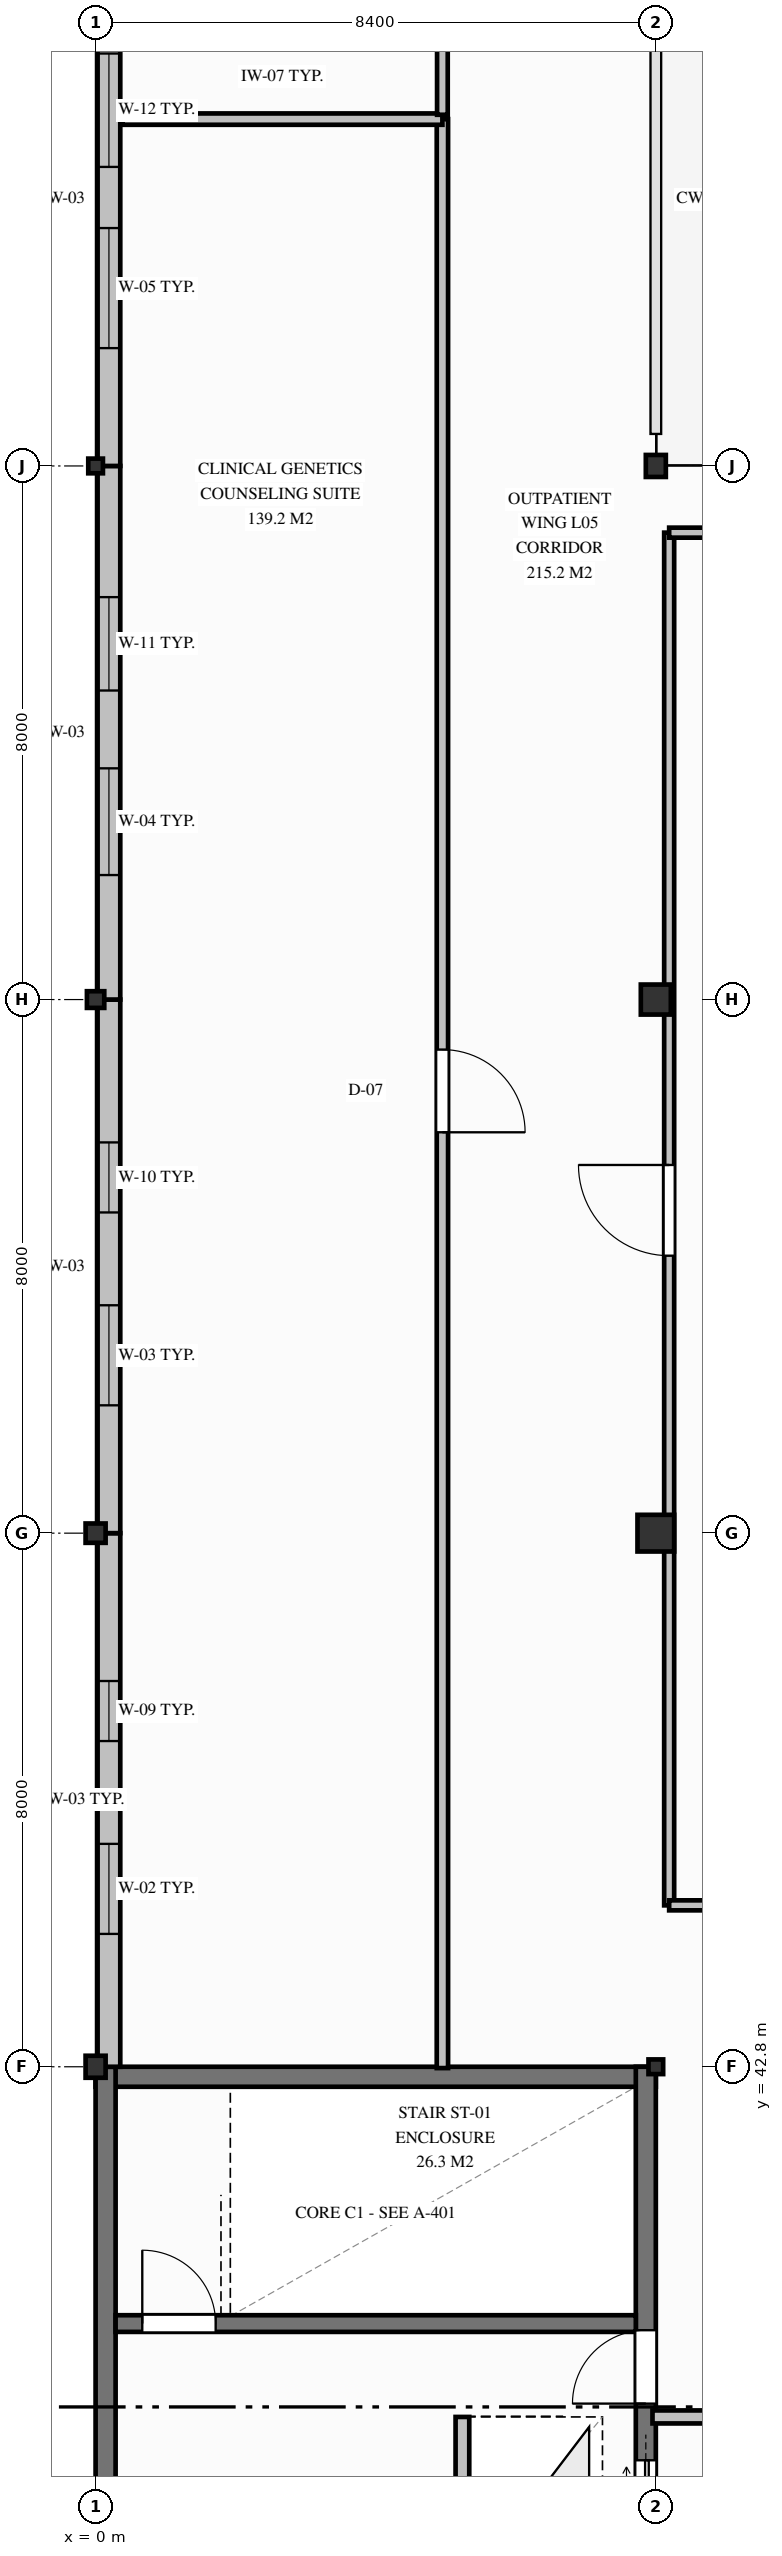
"""IFC4 building model, lengths in metres.
Left out: names, types, materials, properties, quantities, classifications, styles, units other than length and angle.
Written with IfcOpenShell. Run it as: python <this file> out.ifc"""

import sys

from ifc_helpers import new_model, si_unit, direction, frame, frame_2d, origin, origin_2d, place, context, subcontext, project, spatial, rectangle, hollow_rectangle, i_section, extrude, element, fill, save


model = new_model("IFC4")
c1 = context("Model", 3, precision=1e-05, world=origin(), true_north=direction((0.0, 1.0)))
c2 = subcontext(c1, "Body", "Model", "MODEL_VIEW")
j1 = project(units=[si_unit("LENGTHUNIT", "METRE"), si_unit("PLANEANGLEUNIT", "RADIAN")], contexts=[c1])
p1 = place(None, origin())
s1 = spatial("IfcSite", under=j1, at=p1, CompositionType="ELEMENT")
p2 = place(p1, origin())
s2 = spatial("IfcBuilding", under=s1, at=p2, CompositionType="ELEMENT")
p3 = place(p2, frame((0.0, 0.0, 21.3)))
s3 = spatial("IfcBuildingStorey", under=s2, at=p3, CompositionType="ELEMENT", Elevation=21.3)
p4 = place(p3, frame((0.0, 42.65, 0.0), z_axis=(0.0, 0.0, 1.0), x_axis=(1.0, 0.0, 0.0)))
e1 = element("IfcWall", 1, at=p4, inside=s3, PredefinedType="SHEAR", context=c2, shape_type="SweptSolid", body=[
    extrude(rectangle(XDim=8.4, YDim=0.3, at=frame_2d((4.2, 0.0))), origin(), (0.0, 0.0, 1.0), 5.15),
])
p5 = place(p3, frame((0.15, 34.8, 0.0), z_axis=(0.0, 0.0, 1.0), x_axis=(0.0, 1.0, 0.0)))
e2 = element("IfcWall", 2, at=p5, inside=s3, PredefinedType="SHEAR", context=c2, shape_type="SweptSolid", body=[
    extrude(rectangle(XDim=8.0, YDim=0.3, at=frame_2d((4.0, 0.0))), origin(), (0.0, 0.0, 1.0), 5.15),
])
p6 = place(p3, frame((8.25, 34.8, 0.0), z_axis=(0.0, 0.0, 1.0), x_axis=(0.0, 1.0, 0.0)))
e3 = element("IfcWall", 3, at=p6, inside=s3, PredefinedType="SHEAR", context=c2, shape_type="SweptSolid", body=[
    extrude(rectangle(XDim=8.0, YDim=0.3, at=frame_2d((4.0, 0.0))), origin(), (0.0, 0.0, 1.0), 5.15),
])
p7 = place(p6, frame((2.95, 0.0, 0.0)))
e4 = element("IfcOpeningElement", 4, at=p7, cuts=e3, PredefinedType="OPENING", context=c2, shape_type="SweptSolid", body=[
    extrude(rectangle(XDim=1.1, YDim=2.15, at=frame_2d((0.55, 1.075))), frame((0.0, 0.16, 0.0), z_axis=(0.0, -1.0, 0.0), x_axis=(1.0, 0.0, 0.0)), (0.0, 0.0, 1.0), 0.32),
])
p8 = place(p6, frame((1.0, 0.0, 0.0)))
e5 = element("IfcOpeningElement", 5, at=p8, cuts=e3, PredefinedType="OPENING", context=c2, shape_type="SweptSolid", body=[
    extrude(rectangle(XDim=1.1, YDim=2.1, at=frame_2d((0.55, 1.05))), frame((0.0, 0.16, 0.0), z_axis=(0.0, -1.0, 0.0), x_axis=(1.0, 0.0, 0.0)), (0.0, 0.0, 1.0), 0.32),
])
p9 = place(p3, frame((0.3, 38.95, 0.0), z_axis=(0.0, 0.0, 1.0), x_axis=(1.0, 0.0, 0.0)))
e6 = element("IfcWall", 6, at=p9, inside=s3, PredefinedType="SHEAR", context=c2, shape_type="SweptSolid", body=[
    extrude(rectangle(XDim=7.8, YDim=0.25, at=frame_2d((3.9, 0.0))), origin(), (0.0, 0.0, 1.0), 5.15),
])
p10 = place(p9, frame((0.4, 0.0, 0.0)))
e7 = element("IfcOpeningElement", 7, at=p10, cuts=e6, PredefinedType="OPENING", context=c2, shape_type="SweptSolid", body=[
    extrude(rectangle(XDim=1.1, YDim=2.15, at=frame_2d((0.55, 1.075))), frame((0.0, 0.135, 0.0), z_axis=(0.0, -1.0, 0.0), x_axis=(1.0, 0.0, 0.0)), (0.0, 0.0, 1.0), 0.27),
])
p11 = place(p3, frame((0.0, 42.8, 0.0), z_axis=(0.0, 0.0, 1.0), x_axis=(1.0, 0.0, 0.0)))
e8 = element("IfcColumn", 8, at=p11, inside=s3, PredefinedType="COLUMN", context=c2, shape_type="SweptSolid", body=[
    extrude(i_section(OverallWidth=0.3, OverallDepth=0.33, WebThickness=0.01, FlangeThickness=0.017, FilletRadius=0.027, at=origin_2d()), origin(), (0.0, 0.0, 1.0), 4.05),
])
p12 = place(p3, frame((0.0, 50.8, 0.0), z_axis=(0.0, 0.0, 1.0), x_axis=(1.0, 0.0, 0.0)))
e9 = element("IfcColumn", 9, at=p12, inside=s3, PredefinedType="COLUMN", context=c2, shape_type="SweptSolid", body=[
    extrude(i_section(OverallWidth=0.3, OverallDepth=0.29, WebThickness=0.009, FlangeThickness=0.014, FilletRadius=0.027, at=origin_2d()), origin(), (0.0, 0.0, 1.0), 4.05),
])
p13 = place(p3, frame((0.0, 58.8, 0.0), z_axis=(0.0, 0.0, 1.0), x_axis=(1.0, 0.0, 0.0)))
e10 = element("IfcColumn", 10, at=p13, inside=s3, PredefinedType="COLUMN", context=c2, shape_type="SweptSolid", body=[
    extrude(i_section(OverallWidth=0.26, OverallDepth=0.25, WebThickness=0.008, FlangeThickness=0.012, FilletRadius=0.024, at=origin_2d()), origin(), (0.0, 0.0, 1.0), 4.05),
])
for number, where, z_axis, x_axis in (
    (11, (0.0, 66.8, 0.0), (0.0, 0.0, 1.0), (1.0, 0.0, 0.0)),
    (12, (8.4, 42.8, 0.0), (0.0, 0.0, 1.0), (1.0, 0.0, 0.0)),
):
    element("IfcColumn", number, at=place(p3, frame(where, z_axis=z_axis, x_axis=x_axis)), inside=s3, PredefinedType="COLUMN", context=c2, shape_type="SweptSolid", body=[
        extrude(hollow_rectangle(XDim=0.22, YDim=0.22, WallThickness=0.012, InnerFilletRadius=0.019, OuterFilletRadius=0.031, at=origin_2d()), origin(), (0.0, 0.0, 1.0), 4.05),
    ])
p14 = place(p3, frame((8.4, 50.8, 0.0), z_axis=(0.0, 0.0, 1.0), x_axis=(1.0, 0.0, 0.0)))
e13 = element("IfcColumn", 13, at=p14, inside=s3, PredefinedType="COLUMN", context=c2, shape_type="SweptSolid", body=[
    extrude(rectangle(XDim=0.55, YDim=0.55, at=origin_2d()), origin(), (0.0, 0.0, 1.0), 4.05),
])
p15 = place(p3, frame((8.4, 58.8, 0.0), z_axis=(0.0, 0.0, 1.0), x_axis=(1.0, 0.0, 0.0)))
e14 = element("IfcColumn", 14, at=p15, inside=s3, PredefinedType="COLUMN", context=c2, shape_type="SweptSolid", body=[
    extrude(rectangle(XDim=0.45, YDim=0.45, at=origin_2d()), origin(), (0.0, 0.0, 1.0), 4.05),
])
p16 = place(p3, frame((8.4, 66.8, 0.0), z_axis=(0.0, 0.0, 1.0), x_axis=(1.0, 0.0, 0.0)))
e15 = element("IfcColumn", 15, at=p16, inside=s3, PredefinedType="COLUMN", context=c2, shape_type="SweptSolid", body=[
    extrude(i_section(OverallWidth=0.3, OverallDepth=0.33, WebThickness=0.01, FlangeThickness=0.017, FilletRadius=0.027, at=origin_2d()), origin(), (0.0, 0.0, 1.0), 4.05),
])
p17 = place(p3, frame((0.2, 42.8, 0.0), z_axis=(0.0, 0.0, 1.0), x_axis=(0.0, 1.0, 0.0)))
e16 = element("IfcWall", 16, at=p17, inside=s3, PredefinedType="SOLIDWALL", context=c2, shape_type="SweptSolid", body=[
    extrude(rectangle(XDim=8.0, YDim=0.34, at=frame_2d((4.0, 0.0))), origin(), (0.0, 0.0, 1.0), 3.378),
])
p18 = place(p17, frame((1.992, 0.0, 0.85)))
e17 = element("IfcOpeningElement", 17, at=p18, cuts=e16, PredefinedType="OPENING", context=c2, shape_type="SweptSolid", body=[
    extrude(rectangle(XDim=1.35, YDim=1.8, at=frame_2d((0.675, 0.9))), frame((0.0, 0.18, 0.0), z_axis=(0.0, -1.0, 0.0), x_axis=(1.0, 0.0, 0.0)), (0.0, 0.0, 1.0), 0.36),
])
p19 = place(p17, frame((4.883, 0.0, 0.85)))
e18 = element("IfcOpeningElement", 18, at=p19, cuts=e16, PredefinedType="OPENING", context=c2, shape_type="SweptSolid", body=[
    extrude(rectangle(XDim=0.9, YDim=1.8, at=frame_2d((0.45, 0.9))), frame((0.0, 0.18, 0.0), z_axis=(0.0, -1.0, 0.0), x_axis=(1.0, 0.0, 0.0)), (0.0, 0.0, 1.0), 0.36),
])
p20 = place(p3, frame((0.2, 50.8, 0.0), z_axis=(0.0, 0.0, 1.0), x_axis=(0.0, 1.0, 0.0)))
e19 = element("IfcWall", 19, at=p20, inside=s3, PredefinedType="SOLIDWALL", context=c2, shape_type="SweptSolid", body=[
    extrude(rectangle(XDim=8.0, YDim=0.34, at=frame_2d((4.0, 0.0))), origin(), (0.0, 0.0, 1.0), 3.388),
])
p21 = place(p20, frame((1.917, 0.0, 0.85)))
e20 = element("IfcOpeningElement", 20, at=p21, cuts=e19, PredefinedType="OPENING", context=c2, shape_type="SweptSolid", body=[
    extrude(rectangle(XDim=1.5, YDim=1.85, at=frame_2d((0.75, 0.925))), frame((0.0, 0.18, 0.0), z_axis=(0.0, -1.0, 0.0), x_axis=(1.0, 0.0, 0.0)), (0.0, 0.0, 1.0), 0.36),
])
p22 = place(p20, frame((4.808, 0.0, 0.85)))
e21 = element("IfcOpeningElement", 21, at=p22, cuts=e19, PredefinedType="OPENING", context=c2, shape_type="SweptSolid", body=[
    extrude(rectangle(XDim=1.05, YDim=1.75, at=frame_2d((0.525, 0.875))), frame((0.0, 0.18, 0.0), z_axis=(0.0, -1.0, 0.0), x_axis=(1.0, 0.0, 0.0)), (0.0, 0.0, 1.0), 0.36),
])
p23 = place(p3, frame((0.2, 58.8, 0.0), z_axis=(0.0, 0.0, 1.0), x_axis=(0.0, 1.0, 0.0)))
e22 = element("IfcWall", 22, at=p23, inside=s3, PredefinedType="SOLIDWALL", context=c2, shape_type="SweptSolid", body=[
    extrude(rectangle(XDim=8.0, YDim=0.34, at=frame_2d((4.0, 0.0))), origin(), (0.0, 0.0, 1.0), 3.508),
])
p24 = place(p23, frame((1.867, 0.0, 0.85)))
e23 = element("IfcOpeningElement", 23, at=p24, cuts=e22, PredefinedType="OPENING", context=c2, shape_type="SweptSolid", body=[
    extrude(rectangle(XDim=1.6, YDim=1.9, at=frame_2d((0.8, 0.95))), frame((0.0, 0.18, 0.0), z_axis=(0.0, -1.0, 0.0), x_axis=(1.0, 0.0, 0.0)), (0.0, 0.0, 1.0), 0.36),
])
p25 = place(p23, frame((4.633, 0.0, 0.85)))
e24 = element("IfcOpeningElement", 24, at=p25, cuts=e22, PredefinedType="OPENING", context=c2, shape_type="SweptSolid", body=[
    extrude(rectangle(XDim=1.4, YDim=1.65, at=frame_2d((0.7, 0.825))), frame((0.0, 0.18, 0.0), z_axis=(0.0, -1.0, 0.0), x_axis=(1.0, 0.0, 0.0)), (0.0, 0.0, 1.0), 0.36),
])
p26 = place(p3, frame((0.2, 66.8, 0.0), z_axis=(0.0, 0.0, 1.0), x_axis=(0.0, 1.0, 0.0)))
e25 = element("IfcWall", 25, at=p26, inside=s3, PredefinedType="SOLIDWALL", context=c2, shape_type="SweptSolid", body=[
    extrude(rectangle(XDim=8.0, YDim=0.34, at=frame_2d((4.0, 0.0))), origin(), (0.0, 0.0, 1.0), 3.328),
])
p27 = place(p26, frame((1.767, 0.0, 0.85)))
e26 = element("IfcOpeningElement", 26, at=p27, cuts=e25, PredefinedType="OPENING", context=c2, shape_type="SweptSolid", body=[
    extrude(rectangle(XDim=1.8, YDim=1.95, at=frame_2d((0.9, 0.975))), frame((0.0, 0.18, 0.0), z_axis=(0.0, -1.0, 0.0), x_axis=(1.0, 0.0, 0.0)), (0.0, 0.0, 1.0), 0.36),
])
p28 = place(p26, frame((4.483, 0.0, 0.85)))
e27 = element("IfcOpeningElement", 27, at=p28, cuts=e25, PredefinedType="OPENING", context=c2, shape_type="SweptSolid", body=[
    extrude(rectangle(XDim=1.7, YDim=1.75, at=frame_2d((0.85, 0.875))), frame((0.0, 0.18, 0.0), z_axis=(0.0, -1.0, 0.0), x_axis=(1.0, 0.0, 0.0)), (0.0, 0.0, 1.0), 0.36),
])
p29 = place(p3, frame((5.5, 35.15, 0.0), z_axis=(0.0, 0.0, 1.0), x_axis=(0.0, 1.0, 0.0)))
e28 = element("IfcWall", 28, at=p29, inside=s3, PredefinedType="PARTITIONING", context=c2, shape_type="SweptSolid", body=[
    extrude(rectangle(XDim=2.4, YDim=0.205, at=frame_2d((1.2, 0.0))), origin(), (0.0, 0.0, 1.0), 3.78),
])
p30 = place(p3, frame((8.35, 37.55, 0.0), z_axis=(0.0, 0.0, 1.0), x_axis=(1.0, 0.0, 0.0)))
e29 = element("IfcWall", 29, at=p30, inside=s3, PredefinedType="PARTITIONING", context=c2, shape_type="SweptSolid", body=[
    extrude(rectangle(XDim=3.1, YDim=0.195, at=frame_2d((1.55, 0.0))), origin(), (0.0, 0.0, 1.0), 3.178),
])
p31 = place(p30, frame((0.95, 0.0, 0.0)))
e30 = element("IfcOpeningElement", 30, at=p31, cuts=e29, PredefinedType="OPENING", context=c2, shape_type="SweptSolid", body=[
    extrude(rectangle(XDim=1.2, YDim=2.15, at=frame_2d((0.6, 1.075))), frame((0.0, 0.107, 0.0), z_axis=(0.0, -1.0, 0.0), x_axis=(1.0, 0.0, 0.0)), (0.0, 0.0, 1.0), 0.215),
])
p32 = place(p3, frame((5.2, 72.0, 0.0), z_axis=(0.0, 0.0, 1.0), x_axis=(0.0, -1.0, 0.0)))
e31 = element("IfcWall", 31, at=p32, inside=s3, PredefinedType="PARTITIONING", context=c2, shape_type="SweptSolid", body=[
    extrude(rectangle(XDim=29.22, YDim=0.17, at=frame_2d((14.61, 0.0))), origin(), (0.0, 0.0, 1.0), 3.378),
])
p33 = place(p32, frame((13.95, 0.0, 0.0)))
e32 = element("IfcOpeningElement", 32, at=p33, cuts=e31, PredefinedType="OPENING", context=c2, shape_type="SweptSolid", body=[
    extrude(rectangle(XDim=1.24, YDim=2.2, at=frame_2d((0.62, 1.1))), frame((0.0, 0.095, 0.0), z_axis=(0.0, -1.0, 0.0), x_axis=(1.0, 0.0, 0.0)), (0.0, 0.0, 1.0), 0.19),
])
p34 = place(p3, frame((0.4, 72.0, 0.0), z_axis=(0.0, 0.0, 1.0), x_axis=(1.0, 0.0, 0.0)))
e33 = element("IfcWall", 33, at=p34, inside=s3, PredefinedType="PARTITIONING", context=c2, shape_type="SweptSolid", body=[
    extrude(rectangle(XDim=4.8, YDim=0.17, at=frame_2d((2.4, 0.0))), origin(), (0.0, 0.0, 1.0), 3.78),
])
p35 = place(p3, frame((5.2, 94.4, 0.0), z_axis=(0.0, 0.0, 1.0), x_axis=(0.0, -1.0, 0.0)))
e34 = element("IfcWall", 34, at=p35, inside=s3, PredefinedType="PARTITIONING", context=c2, shape_type="SweptSolid", body=[
    extrude(rectangle(XDim=22.335, YDim=0.16, at=frame_2d((11.167, 0.0))), origin(), (0.0, 0.0, 1.0), 3.328),
])
p36 = place(p35, frame((10.45, 0.0, 0.0)))
e35 = element("IfcOpeningElement", 35, at=p36, cuts=e34, PredefinedType="OPENING", context=c2, shape_type="SweptSolid", body=[
    extrude(rectangle(XDim=1.28, YDim=2.22, at=frame_2d((0.64, 1.11))), frame((0.0, 0.09, 0.0), z_axis=(0.0, -1.0, 0.0), x_axis=(1.0, 0.0, 0.0)), (0.0, 0.0, 1.0), 0.18),
])
p37 = place(p3, frame((8.6, 45.22, 0.0), z_axis=(0.0, 0.0, 1.0), x_axis=(0.0, 1.0, 0.0)))
e36 = element("IfcWall", 36, at=p37, inside=s3, PredefinedType="PARTITIONING", context=c2, shape_type="SweptSolid", body=[
    extrude(rectangle(XDim=20.58, YDim=0.15, at=frame_2d((10.29, 0.0))), origin(), (0.0, 0.0, 1.0), 3.328),
])
p38 = place(p37, frame((9.74, 0.0, 0.0)))
e37 = element("IfcOpeningElement", 37, at=p38, cuts=e36, PredefinedType="OPENING", context=c2, shape_type="SweptSolid", body=[
    extrude(rectangle(XDim=1.36, YDim=2.2, at=frame_2d((0.68, 1.1))), frame((0.0, 0.085, 0.0), z_axis=(0.0, -1.0, 0.0), x_axis=(1.0, 0.0, 0.0)), (0.0, 0.0, 1.0), 0.17),
])
p39 = place(p3, frame((12.22, 45.22, 0.0), z_axis=(0.0, 0.0, 1.0), x_axis=(-1.0, 0.0, 0.0)))
e38 = element("IfcWall", 38, at=p39, inside=s3, PredefinedType="PARTITIONING", context=c2, shape_type="SweptSolid", body=[
    extrude(rectangle(XDim=3.62, YDim=0.15, at=frame_2d((1.81, 0.0))), origin(), (0.0, 0.0, 1.0), 3.328),
])
p40 = place(p3, frame((8.6, 65.8, 0.0), z_axis=(0.0, 0.0, 1.0), x_axis=(1.0, 0.0, 0.0)))
e39 = element("IfcWall", 39, at=p40, inside=s3, PredefinedType="PARTITIONING", context=c2, shape_type="SweptSolid", body=[
    extrude(rectangle(XDim=7.4, YDim=0.15, at=frame_2d((3.7, 0.0))), origin(), (0.0, 0.0, 1.0), 3.438),
])
p41 = place(p18, origin())
e40 = element("IfcWindow", 40, at=p41, inside=s3, PartitioningType="SINGLE_PANEL", PredefinedType="WINDOW", context=c2, shape_type="SweptSolid", body=[
    extrude(rectangle(XDim=1.35, YDim=1.8, at=frame_2d((0.675, 0.9))), frame((0.0, 0.03, 0.0), z_axis=(0.0, -1.0, 0.0), x_axis=(1.0, 0.0, 0.0)), (0.0, 0.0, 1.0), 0.06),
])
fill(e17, e40)
p42 = place(p19, origin())
e41 = element("IfcWindow", 41, at=p42, inside=s3, PartitioningType="SINGLE_PANEL", PredefinedType="WINDOW", context=c2, shape_type="SweptSolid", body=[
    extrude(rectangle(XDim=0.9, YDim=1.8, at=frame_2d((0.45, 0.9))), frame((0.0, 0.03, 0.0), z_axis=(0.0, -1.0, 0.0), x_axis=(1.0, 0.0, 0.0)), (0.0, 0.0, 1.0), 0.06),
])
fill(e18, e41)
p43 = place(p21, origin())
e42 = element("IfcWindow", 42, at=p43, inside=s3, PartitioningType="SINGLE_PANEL", PredefinedType="WINDOW", context=c2, shape_type="SweptSolid", body=[
    extrude(rectangle(XDim=1.5, YDim=1.85, at=frame_2d((0.75, 0.925))), frame((0.0, 0.03, 0.0), z_axis=(0.0, -1.0, 0.0), x_axis=(1.0, 0.0, 0.0)), (0.0, 0.0, 1.0), 0.06),
])
fill(e20, e42)
p44 = place(p22, origin())
e43 = element("IfcWindow", 43, at=p44, inside=s3, PartitioningType="SINGLE_PANEL", PredefinedType="WINDOW", context=c2, shape_type="SweptSolid", body=[
    extrude(rectangle(XDim=1.05, YDim=1.75, at=frame_2d((0.525, 0.875))), frame((0.0, 0.03, 0.0), z_axis=(0.0, -1.0, 0.0), x_axis=(1.0, 0.0, 0.0)), (0.0, 0.0, 1.0), 0.06),
])
fill(e21, e43)
p45 = place(p24, origin())
e44 = element("IfcWindow", 44, at=p45, inside=s3, PartitioningType="SINGLE_PANEL", PredefinedType="WINDOW", context=c2, shape_type="SweptSolid", body=[
    extrude(rectangle(XDim=1.6, YDim=1.9, at=frame_2d((0.8, 0.95))), frame((0.0, 0.03, 0.0), z_axis=(0.0, -1.0, 0.0), x_axis=(1.0, 0.0, 0.0)), (0.0, 0.0, 1.0), 0.06),
])
fill(e23, e44)
p46 = place(p25, origin())
e45 = element("IfcWindow", 45, at=p46, inside=s3, PartitioningType="SINGLE_PANEL", PredefinedType="WINDOW", context=c2, shape_type="SweptSolid", body=[
    extrude(rectangle(XDim=1.4, YDim=1.65, at=frame_2d((0.7, 0.825))), frame((0.0, 0.03, 0.0), z_axis=(0.0, -1.0, 0.0), x_axis=(1.0, 0.0, 0.0)), (0.0, 0.0, 1.0), 0.06),
])
fill(e24, e45)
p47 = place(p27, origin())
e46 = element("IfcWindow", 46, at=p47, inside=s3, PartitioningType="SINGLE_PANEL", PredefinedType="WINDOW", context=c2, shape_type="SweptSolid", body=[
    extrude(rectangle(XDim=1.8, YDim=1.95, at=frame_2d((0.9, 0.975))), frame((0.0, 0.03, 0.0), z_axis=(0.0, -1.0, 0.0), x_axis=(1.0, 0.0, 0.0)), (0.0, 0.0, 1.0), 0.06),
])
fill(e26, e46)
p48 = place(p28, origin())
e47 = element("IfcWindow", 47, at=p48, inside=s3, PartitioningType="SINGLE_PANEL", PredefinedType="WINDOW", context=c2, shape_type="SweptSolid", body=[
    extrude(rectangle(XDim=1.7, YDim=1.75, at=frame_2d((0.85, 0.875))), frame((0.0, 0.03, 0.0), z_axis=(0.0, -1.0, 0.0), x_axis=(1.0, 0.0, 0.0)), (0.0, 0.0, 1.0), 0.06),
])
fill(e27, e47)
p49 = place(p10, origin())
e48 = element("IfcDoor", 48, at=p49, inside=s3, OperationType="SINGLE_SWING_LEFT", PredefinedType="DOOR", context=c2, shape_type="SweptSolid", body=[
    extrude(rectangle(XDim=1.1, YDim=2.15, at=frame_2d((0.55, 1.075))), frame((0.0, 0.025, 0.0), z_axis=(0.0, -1.0, 0.0), x_axis=(1.0, 0.0, 0.0)), (0.0, 0.0, 1.0), 0.05),
])
fill(e7, e48)
p50 = place(p7, origin())
e49 = element("IfcDoor", 49, at=p50, inside=s3, OperationType="SINGLE_SWING_LEFT", PredefinedType="DOOR", context=c2, shape_type="SweptSolid", body=[
    extrude(rectangle(XDim=1.1, YDim=2.15, at=frame_2d((0.55, 1.075))), frame((0.0, 0.025, 0.0), z_axis=(0.0, -1.0, 0.0), x_axis=(1.0, 0.0, 0.0)), (0.0, 0.0, 1.0), 0.05),
])
fill(e4, e49)
p51 = place(p8, origin())
e50 = element("IfcDoor", 50, at=p51, inside=s3, OperationType="DOUBLE_DOOR_SLIDING", PredefinedType="DOOR", context=c2, shape_type="SweptSolid", body=[
    extrude(rectangle(XDim=1.1, YDim=2.1, at=frame_2d((0.55, 1.05))), frame((0.0, 0.025, 0.0), z_axis=(0.0, -1.0, 0.0), x_axis=(1.0, 0.0, 0.0)), (0.0, 0.0, 1.0), 0.05),
])
fill(e5, e50)
p52 = place(p33, origin())
e51 = element("IfcDoor", 51, at=p52, inside=s3, OperationType="SINGLE_SWING_RIGHT", PredefinedType="DOOR", context=c2, shape_type="SweptSolid", body=[
    extrude(rectangle(XDim=1.24, YDim=2.2, at=frame_2d((0.62, 1.1))), frame((0.0, 0.025, 0.0), z_axis=(0.0, -1.0, 0.0), x_axis=(1.0, 0.0, 0.0)), (0.0, 0.0, 1.0), 0.05),
])
fill(e32, e51)
p53 = place(p38, origin())
e52 = element("IfcDoor", 52, at=p53, inside=s3, OperationType="SINGLE_SWING_RIGHT", PredefinedType="DOOR", context=c2, shape_type="SweptSolid", body=[
    extrude(rectangle(XDim=1.36, YDim=2.2, at=frame_2d((0.68, 1.1))), frame((0.0, 0.025, 0.0), z_axis=(0.0, -1.0, 0.0), x_axis=(1.0, 0.0, 0.0)), (0.0, 0.0, 1.0), 0.05),
])
fill(e37, e52)
save(model, sys.argv[1])
